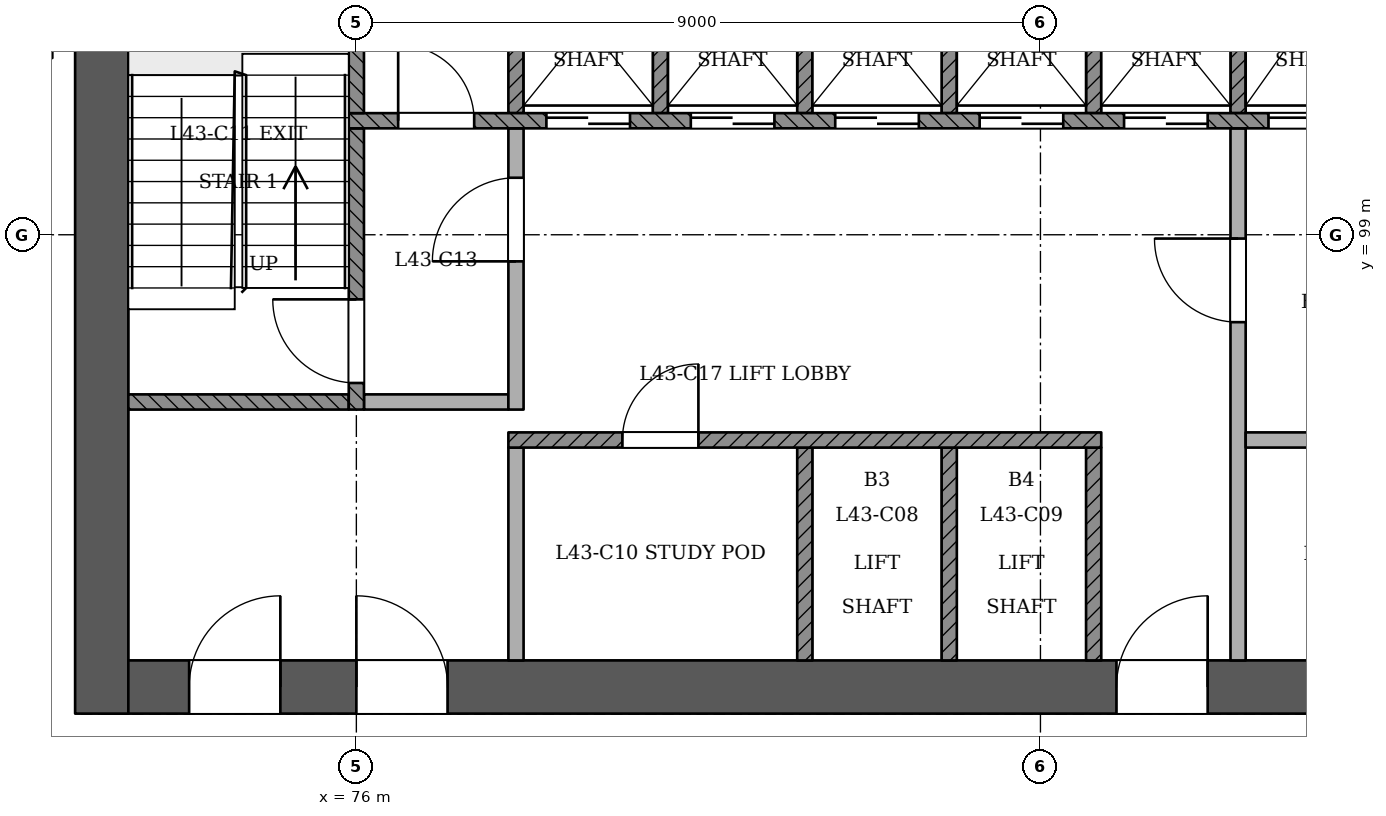
"""IFC4 building model, lengths in metres.
Left out: names, types, materials, properties, quantities, classifications, styles, units other than length and angle.
Written with IfcOpenShell. Run it as: python <this file> out.ifc"""

import sys

from ifc_helpers import new_model, si_unit, direction, frame, frame_2d, origin, place, context, subcontext, project, spatial, rectangle, extrude, element, fill, save


model = new_model("IFC4")
c1 = context("Model", 3, precision=1e-05, world=origin(), true_north=direction((0.0, 1.0)))
c2 = subcontext(c1, "Body", "Model", "MODEL_VIEW")
j1 = project(units=[si_unit("LENGTHUNIT", "METRE"), si_unit("PLANEANGLEUNIT", "RADIAN")], contexts=[c1])
p1 = place(None, origin())
s1 = spatial("IfcSite", under=j1, at=p1, CompositionType="ELEMENT")
p2 = place(p1, origin())
s2 = spatial("IfcBuilding", under=s1, at=p2, CompositionType="ELEMENT")
p3 = place(p2, frame((0.0, 0.0, 167.4)))
s3 = spatial("IfcBuildingStorey", under=s2, at=p3, CompositionType="ELEMENT", Elevation=167.4)
p4 = place(p3, frame((72.65, 93.05, 0.0), z_axis=(0.0, 0.0, 1.0), x_axis=(1.0, 0.0, 0.0)))
e1 = element("IfcWall", 1, at=p4, inside=s3, PredefinedType="SHEAR", context=c2, shape_type="SweptSolid", body=[
    extrude(rectangle(XDim=25.05, YDim=0.7, at=frame_2d((12.525, 0.0))), origin(), (0.0, 0.0, 1.0), 3.6),
])
p5 = place(p4, frame((1.15, 0.0, 0.0)))
e2 = element("IfcOpeningElement", 2, at=p5, cuts=e1, PredefinedType="OPENING", context=c2, shape_type="SweptSolid", body=[
    extrude(rectangle(XDim=1.2, YDim=2.1, at=frame_2d((0.6, 1.05))), frame((0.0, 0.36, 0.0), z_axis=(0.0, -1.0, 0.0), x_axis=(1.0, 0.0, 0.0)), (0.0, 0.0, 1.0), 0.721),
])
p6 = place(p4, frame((3.35, 0.0, 0.0)))
e3 = element("IfcOpeningElement", 3, at=p6, cuts=e1, PredefinedType="OPENING", context=c2, shape_type="SweptSolid", body=[
    extrude(rectangle(XDim=1.2, YDim=2.1, at=frame_2d((0.6, 1.05))), frame((0.0, 0.36, 0.0), z_axis=(0.0, -1.0, 0.0), x_axis=(1.0, 0.0, 0.0)), (0.0, 0.0, 1.0), 0.721),
])
p7 = place(p4, frame((13.35, 0.0, 0.0)))
e4 = element("IfcOpeningElement", 4, at=p7, cuts=e1, PredefinedType="OPENING", context=c2, shape_type="SweptSolid", body=[
    extrude(rectangle(XDim=1.2, YDim=2.1, at=frame_2d((0.6, 1.05))), frame((0.0, 0.36, 0.0), z_axis=(0.0, -1.0, 0.0), x_axis=(1.0, 0.0, 0.0)), (0.0, 0.0, 1.0), 0.721),
])
p8 = place(p4, frame((16.762, 0.0, 0.0)))
e5 = element("IfcOpeningElement", 5, at=p8, cuts=e1, PredefinedType="OPENING", context=c2, shape_type="SweptSolid", body=[
    extrude(rectangle(XDim=1.0, YDim=2.1, at=frame_2d((0.5, 1.05))), frame((0.0, 0.36, 0.0), z_axis=(0.0, -1.0, 0.0), x_axis=(1.0, 0.0, 0.0)), (0.0, 0.0, 1.0), 0.721),
])
p9 = place(p4, frame((20.65, 0.0, 0.0)))
e6 = element("IfcOpeningElement", 6, at=p9, cuts=e1, PredefinedType="OPENING", context=c2, shape_type="SweptSolid", body=[
    extrude(rectangle(XDim=1.0, YDim=2.1, at=frame_2d((0.5, 1.05))), frame((0.0, 0.36, 0.0), z_axis=(0.0, -1.0, 0.0), x_axis=(1.0, 0.0, 0.0)), (0.0, 0.0, 1.0), 0.721),
])
p10 = place(p4, frame((23.087, 0.0, 0.0)))
e7 = element("IfcOpeningElement", 7, at=p10, cuts=e1, PredefinedType="OPENING", context=c2, shape_type="SweptSolid", body=[
    extrude(rectangle(XDim=1.0, YDim=2.1, at=frame_2d((0.5, 1.05))), frame((0.0, 0.36, 0.0), z_axis=(0.0, -1.0, 0.0), x_axis=(1.0, 0.0, 0.0)), (0.0, 0.0, 1.0), 0.721),
])
p11 = place(p3, frame((72.65, 103.75, 0.0), z_axis=(0.0, 0.0, 1.0), x_axis=(0.0, -1.0, 0.0)))
e8 = element("IfcWall", 8, at=p11, inside=s3, PredefinedType="SHEAR", context=c2, shape_type="SweptSolid", body=[
    extrude(rectangle(XDim=11.05, YDim=0.7, at=frame_2d((5.525, 0.0))), origin(), (0.0, 0.0, 1.0), 3.6),
])
p12 = place(p3, frame((78.1, 93.4, 0.0), z_axis=(0.0, 0.0, 1.0), x_axis=(0.0, 1.0, 0.0)))
e9 = element("IfcWall", 9, at=p12, inside=s3, PredefinedType="PARTITIONING", context=c2, shape_type="SweptSolid", body=[
    extrude(rectangle(XDim=2.8, YDim=0.2, at=frame_2d((1.4, 0.0))), origin(), (0.0, 0.0, 1.0), 3.15),
])
for number, where, z_axis, x_axis in (
    (10, (81.9, 93.4, 0.0), (0.0, 0.0, 1.0), (0.0, 1.0, 0.0)),
    (11, (83.8, 93.4, 0.0), (0.0, 0.0, 1.0), (0.0, 1.0, 0.0)),
    (12, (85.7, 93.4, 0.0), (0.0, 0.0, 1.0), (0.0, 1.0, 0.0)),
):
    element("IfcWall", number, at=place(p3, frame(where, z_axis=z_axis, x_axis=x_axis)), inside=s3, PredefinedType="SOLIDWALL", context=c2, shape_type="SweptSolid", body=[
        extrude(rectangle(XDim=2.8, YDim=0.2, at=frame_2d((1.4, 0.0))), origin(), (0.0, 0.0, 1.0), 3.15),
    ])
p13 = place(p3, frame((87.6, 93.4, 0.0), z_axis=(0.0, 0.0, 1.0), x_axis=(0.0, 1.0, 0.0)))
e13 = element("IfcWall", 13, at=p13, inside=s3, PredefinedType="PARTITIONING", context=c2, shape_type="SweptSolid", body=[
    extrude(rectangle(XDim=7.0, YDim=0.2, at=frame_2d((3.5, 0.0))), origin(), (0.0, 0.0, 1.0), 3.15),
])
p14 = place(p13, frame((4.45, 0.0, 0.0)))
e14 = element("IfcOpeningElement", 14, at=p14, cuts=e13, PredefinedType="OPENING", context=c2, shape_type="SweptSolid", body=[
    extrude(rectangle(XDim=1.1, YDim=2.1, at=frame_2d((0.55, 1.05))), frame((0.0, 0.11, 0.0), z_axis=(0.0, -1.0, 0.0), x_axis=(1.0, 0.0, 0.0)), (0.0, 0.0, 1.0), 0.221),
])
p15 = place(p3, frame((78.0, 96.3, 0.0), z_axis=(0.0, 0.0, 1.0), x_axis=(1.0, 0.0, 0.0)))
e15 = element("IfcWall", 15, at=p15, inside=s3, PredefinedType="SOLIDWALL", context=c2, shape_type="SweptSolid", body=[
    extrude(rectangle(XDim=7.8, YDim=0.2, at=frame_2d((3.9, 0.0))), origin(), (0.0, 0.0, 1.0), 3.15),
])
p16 = place(p15, frame((1.5, 0.0, 0.0)))
e16 = element("IfcOpeningElement", 16, at=p16, cuts=e15, PredefinedType="OPENING", context=c2, shape_type="SweptSolid", body=[
    extrude(rectangle(XDim=1.0, YDim=2.1, at=frame_2d((0.5, 1.05))), frame((0.0, 0.11, 0.0), z_axis=(0.0, -1.0, 0.0), x_axis=(1.0, 0.0, 0.0)), (0.0, 0.0, 1.0), 0.221),
])
p17 = place(p3, frame((87.7, 96.3, 0.0), z_axis=(0.0, 0.0, 1.0), x_axis=(1.0, 0.0, 0.0)))
e17 = element("IfcWall", 17, at=p17, inside=s3, PredefinedType="PARTITIONING", context=c2, shape_type="SweptSolid", body=[
    extrude(rectangle(XDim=3.6, YDim=0.2, at=frame_2d((1.8, 0.0))), origin(), (0.0, 0.0, 1.0), 3.15),
])
p18 = place(p3, frame((73.0, 96.8, 0.0), z_axis=(0.0, 0.0, 1.0), x_axis=(1.0, 0.0, 0.0)))
e18 = element("IfcWall", 18, at=p18, inside=s3, PredefinedType="SOLIDWALL", context=c2, shape_type="SweptSolid", body=[
    extrude(rectangle(XDim=2.9, YDim=0.2, at=frame_2d((1.45, 0.0))), origin(), (0.0, 0.0, 1.0), 3.15),
])
p19 = place(p3, frame((76.0, 96.7, 0.0), z_axis=(0.0, 0.0, 1.0), x_axis=(0.0, 1.0, 0.0)))
e19 = element("IfcWall", 19, at=p19, inside=s3, PredefinedType="SOLIDWALL", context=c2, shape_type="SweptSolid", body=[
    extrude(rectangle(XDim=3.7, YDim=0.2, at=frame_2d((1.85, 0.0))), origin(), (0.0, 0.0, 1.0), 3.15),
])
p20 = place(p19, frame((0.35, 0.0, 0.0)))
e20 = element("IfcOpeningElement", 20, at=p20, cuts=e19, PredefinedType="OPENING", context=c2, shape_type="SweptSolid", body=[
    extrude(rectangle(XDim=1.1, YDim=2.1, at=frame_2d((0.55, 1.05))), frame((0.0, 0.11, 0.0), z_axis=(0.0, -1.0, 0.0), x_axis=(1.0, 0.0, 0.0)), (0.0, 0.0, 1.0), 0.221),
])
p21 = place(p3, frame((76.1, 96.8, 0.0), z_axis=(0.0, 0.0, 1.0), x_axis=(1.0, 0.0, 0.0)))
e21 = element("IfcWall", 21, at=p21, inside=s3, PredefinedType="PARTITIONING", context=c2, shape_type="SweptSolid", body=[
    extrude(rectangle(XDim=1.9, YDim=0.2, at=frame_2d((0.95, 0.0))), origin(), (0.0, 0.0, 1.0), 3.15),
])
p22 = place(p3, frame((78.1, 96.7, 0.0), z_axis=(0.0, 0.0, 1.0), x_axis=(0.0, 1.0, 0.0)))
e22 = element("IfcWall", 22, at=p22, inside=s3, PredefinedType="PARTITIONING", context=c2, shape_type="SweptSolid", body=[
    extrude(rectangle(XDim=3.7, YDim=0.2, at=frame_2d((1.85, 0.0))), origin(), (0.0, 0.0, 1.0), 3.15),
])
p23 = place(p22, frame((1.95, 0.0, 0.0)))
e23 = element("IfcOpeningElement", 23, at=p23, cuts=e22, PredefinedType="OPENING", context=c2, shape_type="SweptSolid", body=[
    extrude(rectangle(XDim=1.1, YDim=2.1, at=frame_2d((0.55, 1.05))), frame((0.0, 0.11, 0.0), z_axis=(0.0, -1.0, 0.0), x_axis=(1.0, 0.0, 0.0)), (0.0, 0.0, 1.0), 0.221),
])
p24 = place(p3, frame((75.9, 100.5, 0.0), z_axis=(0.0, 0.0, 1.0), x_axis=(1.0, 0.0, 0.0)))
e24 = element("IfcWall", 24, at=p24, inside=s3, PredefinedType="SOLIDWALL", context=c2, shape_type="SweptSolid", body=[
    extrude(rectangle(XDim=18.2, YDim=0.2, at=frame_2d((9.1, 0.0))), origin(), (0.0, 0.0, 1.0), 3.15),
])
p25 = place(p24, frame((2.6, 0.0, 0.0)))
e25 = element("IfcOpeningElement", 25, at=p25, cuts=e24, PredefinedType="OPENING", context=c2, shape_type="SweptSolid", body=[
    extrude(rectangle(XDim=1.1, YDim=2.1, at=frame_2d((0.55, 1.05))), frame((0.0, 0.11, 0.0), z_axis=(0.0, -1.0, 0.0), x_axis=(1.0, 0.0, 0.0)), (0.0, 0.0, 1.0), 0.221),
])
p26 = place(p24, frame((4.5, 0.0, 0.0)))
e26 = element("IfcOpeningElement", 26, at=p26, cuts=e24, PredefinedType="OPENING", context=c2, shape_type="SweptSolid", body=[
    extrude(rectangle(XDim=1.1, YDim=2.1, at=frame_2d((0.55, 1.05))), frame((0.0, 0.11, 0.0), z_axis=(0.0, -1.0, 0.0), x_axis=(1.0, 0.0, 0.0)), (0.0, 0.0, 1.0), 0.221),
])
p27 = place(p24, frame((6.4, 0.0, 0.0)))
e27 = element("IfcOpeningElement", 27, at=p27, cuts=e24, PredefinedType="OPENING", context=c2, shape_type="SweptSolid", body=[
    extrude(rectangle(XDim=1.1, YDim=2.1, at=frame_2d((0.55, 1.05))), frame((0.0, 0.11, 0.0), z_axis=(0.0, -1.0, 0.0), x_axis=(1.0, 0.0, 0.0)), (0.0, 0.0, 1.0), 0.221),
])
p28 = place(p24, frame((8.3, 0.0, 0.0)))
e28 = element("IfcOpeningElement", 28, at=p28, cuts=e24, PredefinedType="OPENING", context=c2, shape_type="SweptSolid", body=[
    extrude(rectangle(XDim=1.1, YDim=2.1, at=frame_2d((0.55, 1.05))), frame((0.0, 0.11, 0.0), z_axis=(0.0, -1.0, 0.0), x_axis=(1.0, 0.0, 0.0)), (0.0, 0.0, 1.0), 0.221),
])
p29 = place(p24, frame((10.2, 0.0, 0.0)))
e29 = element("IfcOpeningElement", 29, at=p29, cuts=e24, PredefinedType="OPENING", context=c2, shape_type="SweptSolid", body=[
    extrude(rectangle(XDim=1.1, YDim=2.1, at=frame_2d((0.55, 1.05))), frame((0.0, 0.11, 0.0), z_axis=(0.0, -1.0, 0.0), x_axis=(1.0, 0.0, 0.0)), (0.0, 0.0, 1.0), 0.221),
])
p30 = place(p24, frame((12.1, 0.0, 0.0)))
e30 = element("IfcOpeningElement", 30, at=p30, cuts=e24, PredefinedType="OPENING", context=c2, shape_type="SweptSolid", body=[
    extrude(rectangle(XDim=1.1, YDim=2.1, at=frame_2d((0.55, 1.05))), frame((0.0, 0.11, 0.0), z_axis=(0.0, -1.0, 0.0), x_axis=(1.0, 0.0, 0.0)), (0.0, 0.0, 1.0), 0.221),
])
p31 = place(p24, frame((14.0, 0.0, 0.0)))
e31 = element("IfcOpeningElement", 31, at=p31, cuts=e24, PredefinedType="OPENING", context=c2, shape_type="SweptSolid", body=[
    extrude(rectangle(XDim=1.1, YDim=2.1, at=frame_2d((0.55, 1.05))), frame((0.0, 0.11, 0.0), z_axis=(0.0, -1.0, 0.0), x_axis=(1.0, 0.0, 0.0)), (0.0, 0.0, 1.0), 0.221),
])
p32 = place(p24, frame((0.65, 0.0, 0.0)))
e32 = element("IfcOpeningElement", 32, at=p32, cuts=e24, PredefinedType="OPENING", context=c2, shape_type="SweptSolid", body=[
    extrude(rectangle(XDim=1.0, YDim=2.1, at=frame_2d((0.5, 1.05))), frame((0.0, 0.11, 0.0), z_axis=(0.0, -1.0, 0.0), x_axis=(1.0, 0.0, 0.0)), (0.0, 0.0, 1.0), 0.221),
])
p33 = place(p24, frame((16.3, 0.0, 0.0)))
e33 = element("IfcOpeningElement", 33, at=p33, cuts=e24, PredefinedType="OPENING", context=c2, shape_type="SweptSolid", body=[
    extrude(rectangle(XDim=1.0, YDim=2.1, at=frame_2d((0.5, 1.05))), frame((0.0, 0.11, 0.0), z_axis=(0.0, -1.0, 0.0), x_axis=(1.0, 0.0, 0.0)), (0.0, 0.0, 1.0), 0.221),
])
for number, where, z_axis, x_axis in (
    (34, (76.0, 100.6, 0.0), (0.0, 0.0, 1.0), (0.0, 1.0, 0.0)),
    (35, (78.1, 100.6, 0.0), (0.0, 0.0, 1.0), (0.0, 1.0, 0.0)),
    (36, (80.0, 100.6, 0.0), (0.0, 0.0, 1.0), (0.0, 1.0, 0.0)),
    (37, (81.9, 100.6, 0.0), (0.0, 0.0, 1.0), (0.0, 1.0, 0.0)),
    (38, (83.8, 100.6, 0.0), (0.0, 0.0, 1.0), (0.0, 1.0, 0.0)),
    (39, (85.7, 100.6, 0.0), (0.0, 0.0, 1.0), (0.0, 1.0, 0.0)),
    (40, (87.6, 100.6, 0.0), (0.0, 0.0, 1.0), (0.0, 1.0, 0.0)),
):
    element("IfcWall", number, at=place(p3, frame(where, z_axis=z_axis, x_axis=x_axis)), inside=s3, PredefinedType="SOLIDWALL", context=c2, shape_type="SweptSolid", body=[
        extrude(rectangle(XDim=2.8, YDim=0.2, at=frame_2d((1.4, 0.0))), origin(), (0.0, 0.0, 1.0), 3.15),
    ])
p34 = place(p25, origin())
e41 = element("IfcDoor", 41, at=p34, inside=s3, OperationType="SLIDING_TO_RIGHT", PredefinedType="NOTDEFINED", context=c2, shape_type="SweptSolid", body=[
    extrude(rectangle(XDim=1.1, YDim=2.1, at=frame_2d((0.55, 1.05))), frame((0.0, 0.025, 0.0), z_axis=(0.0, -1.0, 0.0), x_axis=(1.0, 0.0, 0.0)), (0.0, 0.0, 1.0), 0.05),
])
fill(e25, e41)
p35 = place(p26, origin())
e42 = element("IfcDoor", 42, at=p35, inside=s3, OperationType="SLIDING_TO_LEFT", PredefinedType="NOTDEFINED", context=c2, shape_type="SweptSolid", body=[
    extrude(rectangle(XDim=1.1, YDim=2.1, at=frame_2d((0.55, 1.05))), frame((0.0, 0.025, 0.0), z_axis=(0.0, -1.0, 0.0), x_axis=(1.0, 0.0, 0.0)), (0.0, 0.0, 1.0), 0.05),
])
fill(e26, e42)
p36 = place(p27, origin())
e43 = element("IfcDoor", 43, at=p36, inside=s3, OperationType="SLIDING_TO_RIGHT", PredefinedType="NOTDEFINED", context=c2, shape_type="SweptSolid", body=[
    extrude(rectangle(XDim=1.1, YDim=2.1, at=frame_2d((0.55, 1.05))), frame((0.0, 0.025, 0.0), z_axis=(0.0, -1.0, 0.0), x_axis=(1.0, 0.0, 0.0)), (0.0, 0.0, 1.0), 0.05),
])
fill(e27, e43)
p37 = place(p28, origin())
e44 = element("IfcDoor", 44, at=p37, inside=s3, OperationType="SLIDING_TO_LEFT", PredefinedType="NOTDEFINED", context=c2, shape_type="SweptSolid", body=[
    extrude(rectangle(XDim=1.1, YDim=2.1, at=frame_2d((0.55, 1.05))), frame((0.0, 0.025, 0.0), z_axis=(0.0, -1.0, 0.0), x_axis=(1.0, 0.0, 0.0)), (0.0, 0.0, 1.0), 0.05),
])
fill(e28, e44)
p38 = place(p29, origin())
e45 = element("IfcDoor", 45, at=p38, inside=s3, OperationType="SLIDING_TO_RIGHT", PredefinedType="NOTDEFINED", context=c2, shape_type="SweptSolid", body=[
    extrude(rectangle(XDim=1.1, YDim=2.1, at=frame_2d((0.55, 1.05))), frame((0.0, 0.025, 0.0), z_axis=(0.0, -1.0, 0.0), x_axis=(1.0, 0.0, 0.0)), (0.0, 0.0, 1.0), 0.05),
])
fill(e29, e45)
p39 = place(p30, origin())
e46 = element("IfcDoor", 46, at=p39, inside=s3, OperationType="SLIDING_TO_RIGHT", PredefinedType="NOTDEFINED", context=c2, shape_type="SweptSolid", body=[
    extrude(rectangle(XDim=1.1, YDim=2.1, at=frame_2d((0.55, 1.05))), frame((0.0, 0.025, 0.0), z_axis=(0.0, -1.0, 0.0), x_axis=(1.0, 0.0, 0.0)), (0.0, 0.0, 1.0), 0.05),
])
fill(e30, e46)
p40 = place(p20, origin())
e47 = element("IfcDoor", 47, at=p40, inside=s3, OperationType="SINGLE_SWING_RIGHT", PredefinedType="NOTDEFINED", context=c2, shape_type="SweptSolid", body=[
    extrude(rectangle(XDim=1.1, YDim=2.1, at=frame_2d((0.55, 1.05))), frame((0.0, 0.025, 0.0), z_axis=(0.0, -1.0, 0.0), x_axis=(1.0, 0.0, 0.0)), (0.0, 0.0, 1.0), 0.05),
])
fill(e20, e47)
p41 = place(p23, origin())
e48 = element("IfcDoor", 48, at=p41, inside=s3, OperationType="SINGLE_SWING_LEFT", PredefinedType="NOTDEFINED", context=c2, shape_type="SweptSolid", body=[
    extrude(rectangle(XDim=1.1, YDim=2.1, at=frame_2d((0.55, 1.05))), frame((0.0, 0.025, 0.0), z_axis=(0.0, -1.0, 0.0), x_axis=(1.0, 0.0, 0.0)), (0.0, 0.0, 1.0), 0.05),
])
fill(e23, e48)
p42 = place(p14, origin())
e49 = element("IfcDoor", 49, at=p42, inside=s3, OperationType="SINGLE_SWING_RIGHT", PredefinedType="NOTDEFINED", context=c2, shape_type="SweptSolid", body=[
    extrude(rectangle(XDim=1.1, YDim=2.1, at=frame_2d((0.55, 1.05))), frame((0.0, 0.025, 0.0), z_axis=(0.0, -1.0, 0.0), x_axis=(1.0, 0.0, 0.0)), (0.0, 0.0, 1.0), 0.05),
])
fill(e14, e49)
p43 = place(p5, origin())
e50 = element("IfcDoor", 50, at=p43, inside=s3, OperationType="SINGLE_SWING_RIGHT", PredefinedType="NOTDEFINED", context=c2, shape_type="SweptSolid", body=[
    extrude(rectangle(XDim=1.2, YDim=2.1, at=frame_2d((0.6, 1.05))), frame((0.0, 0.025, 0.0), z_axis=(0.0, -1.0, 0.0), x_axis=(1.0, 0.0, 0.0)), (0.0, 0.0, 1.0), 0.05),
])
fill(e2, e50)
p44 = place(p6, origin())
e51 = element("IfcDoor", 51, at=p44, inside=s3, OperationType="SINGLE_SWING_LEFT", PredefinedType="NOTDEFINED", context=c2, shape_type="SweptSolid", body=[
    extrude(rectangle(XDim=1.2, YDim=2.1, at=frame_2d((0.6, 1.05))), frame((0.0, 0.025, 0.0), z_axis=(0.0, -1.0, 0.0), x_axis=(1.0, 0.0, 0.0)), (0.0, 0.0, 1.0), 0.05),
])
fill(e3, e51)
p45 = place(p7, origin())
e52 = element("IfcDoor", 52, at=p45, inside=s3, OperationType="SINGLE_SWING_RIGHT", PredefinedType="NOTDEFINED", context=c2, shape_type="SweptSolid", body=[
    extrude(rectangle(XDim=1.2, YDim=2.1, at=frame_2d((0.6, 1.05))), frame((0.0, 0.025, 0.0), z_axis=(0.0, -1.0, 0.0), x_axis=(1.0, 0.0, 0.0)), (0.0, 0.0, 1.0), 0.05),
])
fill(e4, e52)
p46 = place(p32, origin())
e53 = element("IfcDoor", 53, at=p46, inside=s3, OperationType="SINGLE_SWING_LEFT", PredefinedType="NOTDEFINED", context=c2, shape_type="SweptSolid", body=[
    extrude(rectangle(XDim=1.0, YDim=2.1, at=frame_2d((0.5, 1.05))), frame((0.0, 0.025, 0.0), z_axis=(0.0, -1.0, 0.0), x_axis=(1.0, 0.0, 0.0)), (0.0, 0.0, 1.0), 0.05),
])
fill(e32, e53)
p47 = place(p16, origin())
e54 = element("IfcDoor", 54, at=p47, inside=s3, OperationType="SINGLE_SWING_RIGHT", PredefinedType="NOTDEFINED", context=c2, shape_type="SweptSolid", body=[
    extrude(rectangle(XDim=1.0, YDim=2.1, at=frame_2d((0.5, 1.05))), frame((0.0, 0.025, 0.0), z_axis=(0.0, -1.0, 0.0), x_axis=(1.0, 0.0, 0.0)), (0.0, 0.0, 1.0), 0.05),
])
fill(e16, e54)
save(model, sys.argv[1])
